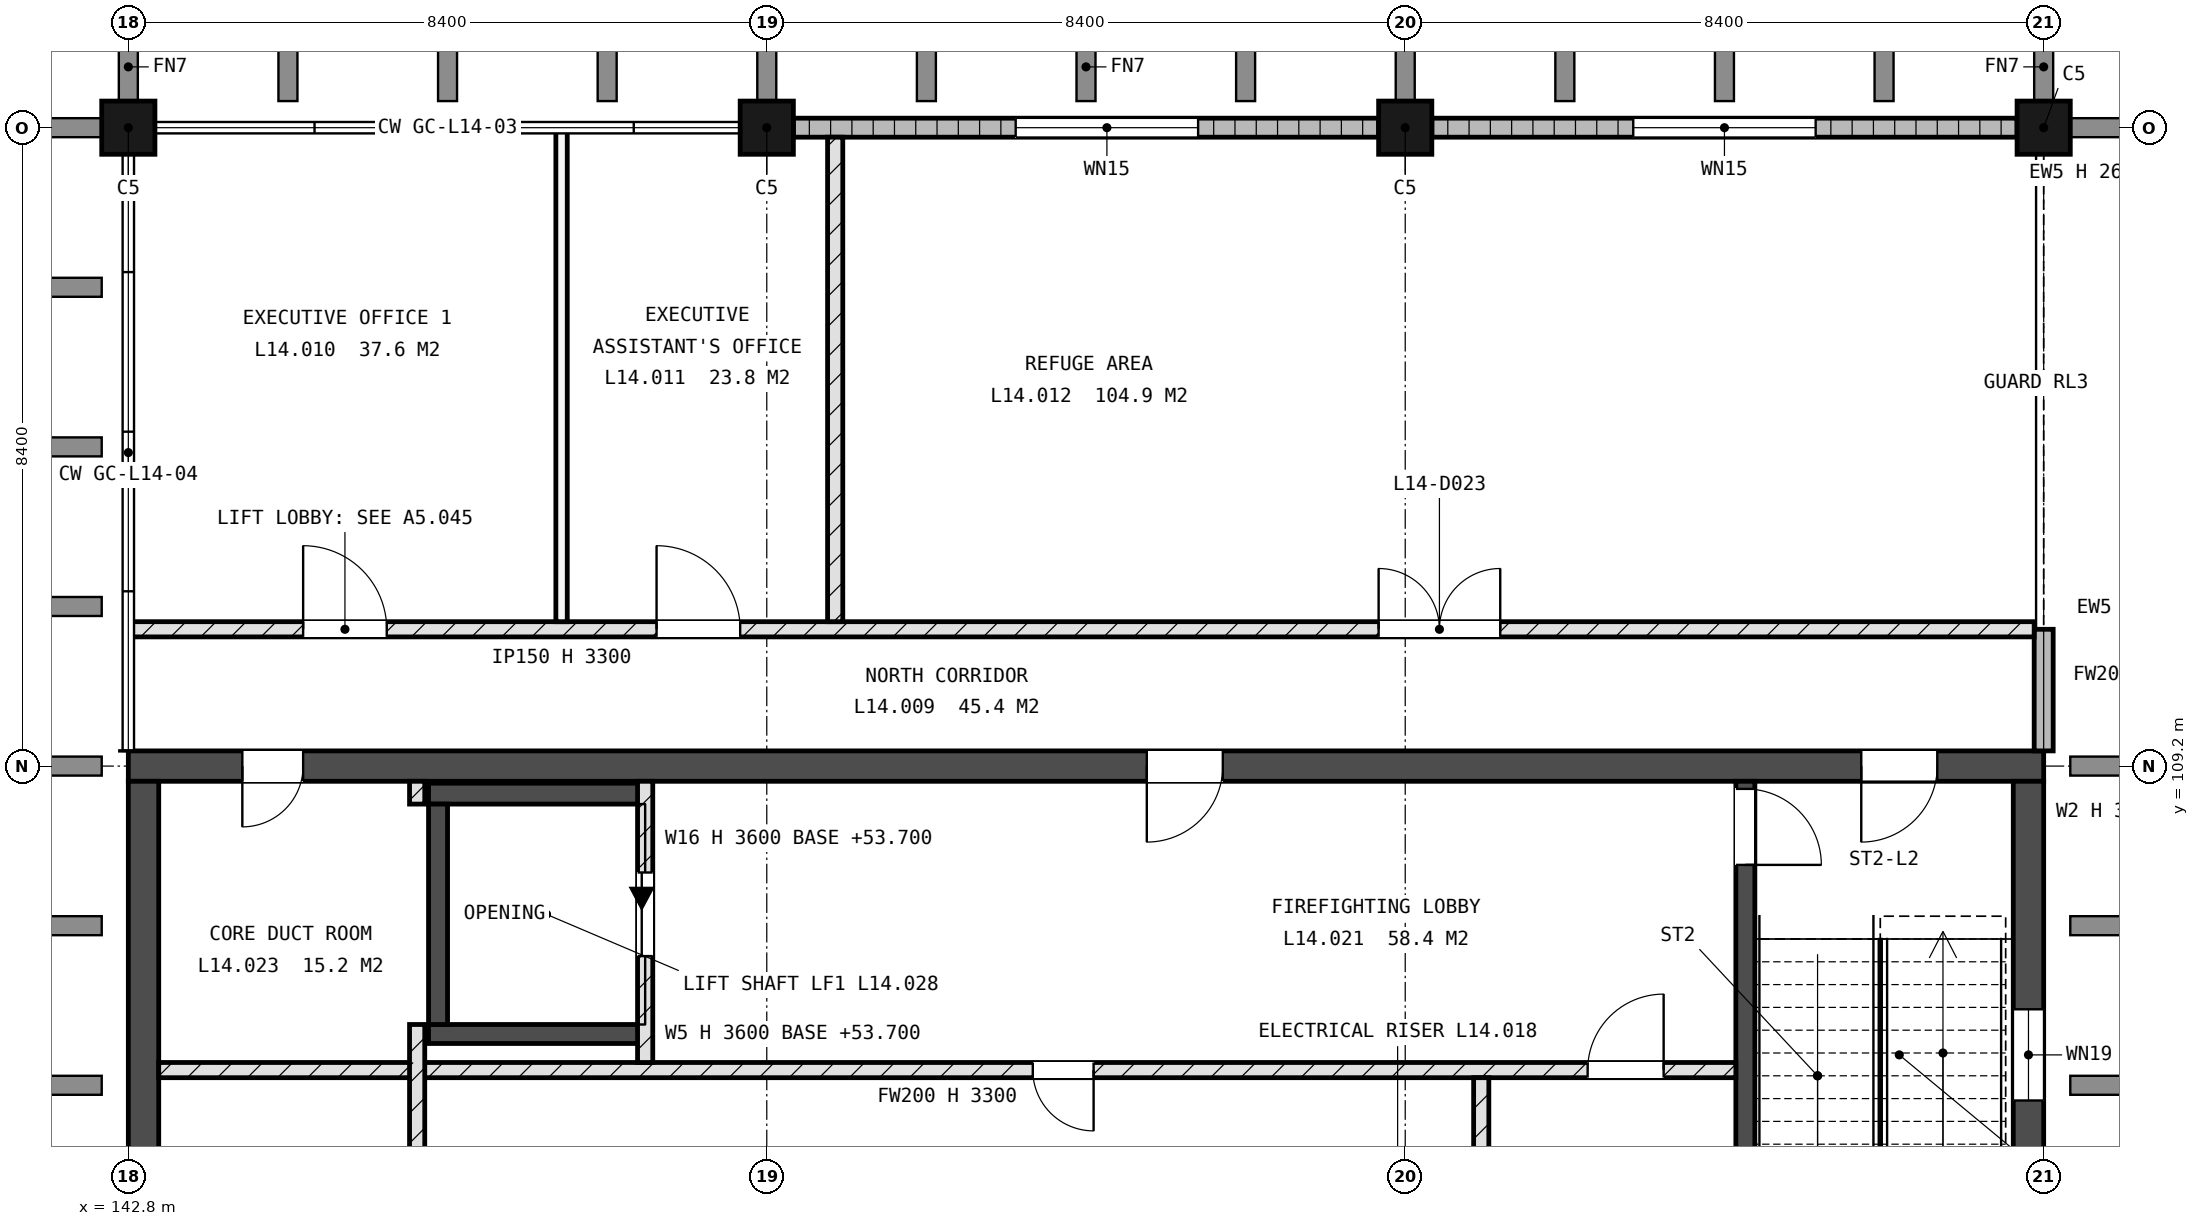
"""IFC4 building model, lengths in metres.
Left out: names, types, materials, properties, quantities, classifications, styles, units other than length and angle.
Written with IfcOpenShell. Run it as: python <this file> out.ifc"""

import sys

from ifc_helpers import new_model, si_unit, direction, frame, frame_2d, origin, origin_2d, place, context, subcontext, project, spatial, rectangle, extrude, element, fill, save


model = new_model("IFC4")
c1 = context("Model", 3, precision=1e-05, world=origin(), true_north=direction((0.0, 1.0)))
c2 = subcontext(c1, "Body", "Model", "MODEL_VIEW")
j1 = project(units=[si_unit("LENGTHUNIT", "METRE"), si_unit("PLANEANGLEUNIT", "RADIAN")], contexts=[c1])
p1 = place(None, origin())
s1 = spatial("IfcSite", under=j1, at=p1, CompositionType="ELEMENT")
p2 = place(p1, origin())
s2 = spatial("IfcBuilding", under=s1, at=p2, CompositionType="ELEMENT")
p3 = place(p2, frame((0.0, 0.0, 54.0)))
s3 = spatial("IfcBuildingStorey", under=s2, at=p3, CompositionType="ELEMENT", Elevation=54.0)
for number, where, z_axis, x_axis in (
    (1, (142.8, 117.6, -0.3), (0.0, 0.0, 1.0), (1.0, 0.0, 0.0)),
    (2, (151.2, 117.6, -0.3), (0.0, 0.0, 1.0), (1.0, 0.0, 0.0)),
    (3, (159.6, 117.6, -0.3), (0.0, 0.0, 1.0), (1.0, 0.0, 0.0)),
    (4, (168.0, 117.6, -0.3), (0.0, 0.0, 1.0), (1.0, 0.0, 0.0)),
):
    element("IfcColumn", number, at=place(p3, frame(where, z_axis=z_axis, x_axis=x_axis)), inside=s3, PredefinedType="COLUMN", context=c2, shape_type="SweptSolid", body=[
        extrude(rectangle(XDim=0.7, YDim=0.7, at=origin_2d()), origin(), (0.0, 0.0, 1.0), 3.6),
    ])
p4 = place(p3, frame((142.8, 109.2, -0.3), z_axis=(0.0, 0.0, 1.0), x_axis=(1.0, 0.0, 0.0)))
e5 = element("IfcWall", 5, at=p4, inside=s3, PredefinedType="SHEAR", context=c2, shape_type="SweptSolid", body=[
    extrude(rectangle(XDim=25.2, YDim=0.4, at=frame_2d((12.6, 0.0))), origin(), (0.0, 0.0, 1.0), 3.6),
])
p5 = place(p4, frame((22.8, 0.0, 0.3)))
e6 = element("IfcOpeningElement", 6, at=p5, cuts=e5, PredefinedType="OPENING", context=c2, shape_type="SweptSolid", body=[
    extrude(rectangle(XDim=1.0, YDim=2.1, at=frame_2d((0.5, 1.05))), frame((0.0, 0.21, 0.0), z_axis=(0.0, -1.0, 0.0), x_axis=(1.0, 0.0, 0.0)), (0.0, 0.0, 1.0), 0.42),
])
p6 = place(p4, frame((1.5, 0.0, 0.3)))
e7 = element("IfcOpeningElement", 7, at=p6, cuts=e5, PredefinedType="OPENING", context=c2, shape_type="SweptSolid", body=[
    extrude(rectangle(XDim=0.8, YDim=2.1, at=frame_2d((0.4, 1.05))), frame((0.0, 0.21, 0.0), z_axis=(0.0, -1.0, 0.0), x_axis=(1.0, 0.0, 0.0)), (0.0, 0.0, 1.0), 0.42),
])
p7 = place(p4, frame((13.4, 0.0, 0.3)))
e8 = element("IfcOpeningElement", 8, at=p7, cuts=e5, PredefinedType="OPENING", context=c2, shape_type="SweptSolid", body=[
    extrude(rectangle(XDim=1.0, YDim=2.1, at=frame_2d((0.5, 1.05))), frame((0.0, 0.21, 0.0), z_axis=(0.0, -1.0, 0.0), x_axis=(1.0, 0.0, 0.0)), (0.0, 0.0, 1.0), 0.42),
])
p8 = place(p3, frame((143.0, 92.6, -0.3), z_axis=(0.0, 0.0, 1.0), x_axis=(0.0, 1.0, 0.0)))
e9 = element("IfcWall", 9, at=p8, inside=s3, PredefinedType="SHEAR", context=c2, shape_type="SweptSolid", body=[
    extrude(rectangle(XDim=16.4, YDim=0.4, at=frame_2d((8.2, 0.0))), origin(), (0.0, 0.0, 1.0), 3.6),
])
p9 = place(p8, frame((3.0, 0.0, 1.9)))
e10 = element("IfcOpeningElement", 10, at=p9, cuts=e9, PredefinedType="OPENING", context=c2, shape_type="SweptSolid", body=[
    extrude(rectangle(XDim=1.2, YDim=0.9, at=frame_2d((0.6, 0.45))), frame((0.0, 0.21, 0.0), z_axis=(0.0, -1.0, 0.0), x_axis=(1.0, 0.0, 0.0)), (0.0, 0.0, 1.0), 0.42),
])
p10 = place(p3, frame((167.8, 92.6, -0.3), z_axis=(0.0, 0.0, 1.0), x_axis=(0.0, 1.0, 0.0)))
e11 = element("IfcWall", 11, at=p10, inside=s3, PredefinedType="SHEAR", context=c2, shape_type="SweptSolid", body=[
    extrude(rectangle(XDim=16.4, YDim=0.4, at=frame_2d((8.2, 0.0))), origin(), (0.0, 0.0, 1.0), 3.6),
])
p11 = place(p10, frame((12.2, 0.0, 1.9)))
e12 = element("IfcOpeningElement", 12, at=p11, cuts=e11, PredefinedType="OPENING", context=c2, shape_type="SweptSolid", body=[
    extrude(rectangle(XDim=1.2, YDim=0.9, at=frame_2d((0.6, 0.45))), frame((0.0, 0.21, 0.0), z_axis=(0.0, -1.0, 0.0), x_axis=(1.0, 0.0, 0.0)), (0.0, 0.0, 1.0), 0.42),
])
p12 = place(p3, frame((164.075, 101.35, -0.3), z_axis=(0.0, 0.0, 1.0), x_axis=(0.0, 1.0, 0.0)))
e13 = element("IfcWall", 13, at=p12, inside=s3, PredefinedType="SHEAR", context=c2, shape_type="SweptSolid", body=[
    extrude(rectangle(XDim=7.65, YDim=0.25, at=frame_2d((3.825, 0.0))), origin(), (0.0, 0.0, 1.0), 3.6),
])
p13 = place(p12, frame((6.55, 0.0, 0.3)))
e14 = element("IfcOpeningElement", 14, at=p13, cuts=e13, PredefinedType="OPENING", context=c2, shape_type="SweptSolid", body=[
    extrude(rectangle(XDim=1.0, YDim=2.1, at=frame_2d((0.5, 1.05))), frame((0.0, 0.135, 0.0), z_axis=(0.0, -1.0, 0.0), x_axis=(1.0, 0.0, 0.0)), (0.0, 0.0, 1.0), 0.27),
])
p14 = place(p3, frame((146.75, 105.675, -0.3), z_axis=(0.0, 0.0, 1.0), x_axis=(1.0, 0.0, 0.0)))
e15 = element("IfcWall", 15, at=p14, inside=s3, PredefinedType="SHEAR", context=c2, shape_type="SweptSolid", body=[
    extrude(rectangle(XDim=2.85, YDim=0.25, at=frame_2d((1.425, 0.0))), origin(), (0.0, 0.0, 1.0), 3.6),
])
p15 = place(p3, frame((146.75, 108.837, -0.3), z_axis=(0.0, 0.0, 1.0), x_axis=(1.0, 0.0, 0.0)))
e16 = element("IfcWall", 16, at=p15, inside=s3, PredefinedType="SHEAR", context=c2, shape_type="SweptSolid", body=[
    extrude(rectangle(XDim=2.85, YDim=0.275, at=frame_2d((1.425, 0.0))), origin(), (0.0, 0.0, 1.0), 3.6),
])
p16 = place(p3, frame((146.875, 105.8, -0.3), z_axis=(0.0, 0.0, 1.0), x_axis=(0.0, 1.0, 0.0)))
e17 = element("IfcWall", 17, at=p16, inside=s3, PredefinedType="SHEAR", context=c2, shape_type="SweptSolid", body=[
    extrude(rectangle(XDim=2.9, YDim=0.25, at=frame_2d((1.45, 0.0))), origin(), (0.0, 0.0, 1.0), 3.6),
])
p17 = place(p3, frame((151.55, 117.6, 0.0), z_axis=(0.0, 0.0, 1.0), x_axis=(1.0, 0.0, 0.0)))
e18 = element("IfcWall", 18, at=p17, inside=s3, PredefinedType="STANDARD", context=c2, shape_type="SweptSolid", body=[
    extrude(rectangle(XDim=7.7, YDim=0.25, at=frame_2d((3.85, 0.0))), origin(), (0.0, 0.0, 1.0), 2.65),
])
p18 = place(p17, frame((2.925, 0.0, 0.9)))
e19 = element("IfcOpeningElement", 19, at=p18, cuts=e18, PredefinedType="OPENING", context=c2, shape_type="SweptSolid", body=[
    extrude(rectangle(XDim=2.4, YDim=1.5, at=frame_2d((1.2, 0.75))), frame((0.0, 0.135, 0.0), z_axis=(0.0, -1.0, 0.0), x_axis=(1.0, 0.0, 0.0)), (0.0, 0.0, 1.0), 0.27),
])
p19 = place(p3, frame((159.95, 117.6, 0.0), z_axis=(0.0, 0.0, 1.0), x_axis=(1.0, 0.0, 0.0)))
e20 = element("IfcWall", 20, at=p19, inside=s3, PredefinedType="STANDARD", context=c2, shape_type="SweptSolid", body=[
    extrude(rectangle(XDim=7.7, YDim=0.25, at=frame_2d((3.85, 0.0))), origin(), (0.0, 0.0, 1.0), 2.65),
])
p20 = place(p19, frame((2.65, 0.0, 0.9)))
e21 = element("IfcOpeningElement", 21, at=p20, cuts=e20, PredefinedType="OPENING", context=c2, shape_type="SweptSolid", body=[
    extrude(rectangle(XDim=2.4, YDim=1.5, at=frame_2d((1.2, 0.75))), frame((0.0, 0.135, 0.0), z_axis=(0.0, -1.0, 0.0), x_axis=(1.0, 0.0, 0.0)), (0.0, 0.0, 1.0), 0.27),
])
p21 = place(p3, frame((168.0, 109.4, 0.0), z_axis=(0.0, 0.0, 1.0), x_axis=(0.0, 1.0, 0.0)))
e22 = element("IfcWall", 22, at=p21, inside=s3, PredefinedType="STANDARD", context=c2, shape_type="SweptSolid", body=[
    extrude(rectangle(XDim=1.6, YDim=0.25, at=frame_2d((0.8, 0.0))), origin(), (0.0, 0.0, 1.0), 3.3),
])
p22 = place(p3, frame((143.2, 105.2, 0.0), z_axis=(0.0, 0.0, 1.0), x_axis=(1.0, 0.0, 0.0)))
e23 = element("IfcWall", 23, at=p22, inside=s3, PredefinedType="SOLIDWALL", context=c2, shape_type="SweptSolid", body=[
    extrude(rectangle(XDim=20.75, YDim=0.2, at=frame_2d((10.375, 0.0))), origin(), (0.0, 0.0, 1.0), 3.3),
])
p23 = place(p22, frame((11.5, 0.0, 0.0)))
e24 = element("IfcOpeningElement", 24, at=p23, cuts=e23, PredefinedType="OPENING", context=c2, shape_type="SweptSolid", body=[
    extrude(rectangle(XDim=0.8, YDim=2.1, at=frame_2d((0.4, 1.05))), frame((0.0, 0.11, 0.0), z_axis=(0.0, -1.0, 0.0), x_axis=(1.0, 0.0, 0.0)), (0.0, 0.0, 1.0), 0.22),
])
p24 = place(p22, frame((18.8, 0.0, 0.0)))
e25 = element("IfcOpeningElement", 25, at=p24, cuts=e23, PredefinedType="OPENING", context=c2, shape_type="SweptSolid", body=[
    extrude(rectangle(XDim=1.0, YDim=2.1, at=frame_2d((0.5, 1.05))), frame((0.0, 0.11, 0.0), z_axis=(0.0, -1.0, 0.0), x_axis=(1.0, 0.0, 0.0)), (0.0, 0.0, 1.0), 0.22),
])
p25 = place(p3, frame((142.8, 111.0, 0.0), z_axis=(0.0, 0.0, 1.0), x_axis=(1.0, 0.0, 0.0)))
e26 = element("IfcWall", 26, at=p25, inside=s3, PredefinedType="SOLIDWALL", context=c2, shape_type="SweptSolid", body=[
    extrude(rectangle(XDim=25.075, YDim=0.2, at=frame_2d((12.538, 0.0))), origin(), (0.0, 0.0, 1.0), 3.3),
])
p26 = place(p25, frame((2.3, 0.0, 0.0)))
e27 = element("IfcOpeningElement", 27, at=p26, cuts=e26, PredefinedType="OPENING", context=c2, shape_type="SweptSolid", body=[
    extrude(rectangle(XDim=1.1, YDim=2.25, at=frame_2d((0.55, 1.125))), frame((0.0, 0.11, 0.0), z_axis=(0.0, -1.0, 0.0), x_axis=(1.0, 0.0, 0.0)), (0.0, 0.0, 1.0), 0.22),
])
p27 = place(p25, frame((6.95, 0.0, 0.0)))
e28 = element("IfcOpeningElement", 28, at=p27, cuts=e26, PredefinedType="OPENING", context=c2, shape_type="SweptSolid", body=[
    extrude(rectangle(XDim=1.1, YDim=2.25, at=frame_2d((0.55, 1.125))), frame((0.0, 0.11, 0.0), z_axis=(0.0, -1.0, 0.0), x_axis=(1.0, 0.0, 0.0)), (0.0, 0.0, 1.0), 0.22),
])
p28 = place(p25, frame((16.45, 0.0, 0.0)))
e29 = element("IfcOpeningElement", 29, at=p28, cuts=e26, PredefinedType="OPENING", context=c2, shape_type="SweptSolid", body=[
    extrude(rectangle(XDim=1.6, YDim=2.25, at=frame_2d((0.8, 1.125))), frame((0.0, 0.11, 0.0), z_axis=(0.0, -1.0, 0.0), x_axis=(1.0, 0.0, 0.0)), (0.0, 0.0, 1.0), 0.22),
])
p29 = place(p3, frame((146.6, 100.5, 0.0), z_axis=(0.0, 0.0, 1.0), x_axis=(0.0, 1.0, 0.0)))
e30 = element("IfcWall", 30, at=p29, inside=s3, PredefinedType="SOLIDWALL", context=c2, shape_type="SweptSolid", body=[
    extrude(rectangle(XDim=5.3, YDim=0.2, at=frame_2d((2.65, 0.0))), origin(), (0.0, 0.0, 1.0), 3.3),
])
p30 = place(p29, frame((1.8, 0.0, 0.0)))
e31 = element("IfcOpeningElement", 31, at=p30, cuts=e30, PredefinedType="OPENING", context=c2, shape_type="SweptSolid", body=[
    extrude(rectangle(XDim=1.0, YDim=2.1, at=frame_2d((0.5, 1.05))), frame((0.0, 0.11, 0.0), z_axis=(0.0, -1.0, 0.0), x_axis=(1.0, 0.0, 0.0)), (0.0, 0.0, 1.0), 0.22),
])
p31 = place(p3, frame((146.6, 108.7, 0.0), z_axis=(0.0, 0.0, 1.0), x_axis=(0.0, 1.0, 0.0)))
e32 = element("IfcWall", 32, at=p31, inside=s3, PredefinedType="SOLIDWALL", context=c2, shape_type="SweptSolid", body=[
    extrude(rectangle(XDim=0.3, YDim=0.2, at=frame_2d((0.15, 0.0))), origin(), (0.0, 0.0, 1.0), 3.3),
])
p32 = place(p3, frame((148.5, 111.1, 0.0), z_axis=(0.0, 0.0, 1.0), x_axis=(0.0, 1.0, 0.0)))
e33 = element("IfcWall", 33, at=p32, inside=s3, PredefinedType="PARTITIONING", context=c2, shape_type="SweptSolid", body=[
    extrude(rectangle(XDim=6.5, YDim=0.15, at=frame_2d((3.25, 0.0))), origin(), (0.0, 0.0, 1.0), 3.3),
])
p33 = place(p3, frame((149.6, 105.3, 0.0), z_axis=(0.0, 0.0, 1.0), x_axis=(0.0, 1.0, 0.0)))
e34 = element("IfcWall", 34, at=p33, inside=s3, PredefinedType="SOLIDWALL", context=c2, shape_type="SweptSolid", body=[
    extrude(rectangle(XDim=3.7, YDim=0.2, at=frame_2d((1.85, 0.0))), origin(), (0.0, 0.0, 1.0), 3.3),
])
p34 = place(p33, frame((1.4, 0.0, 0.0)))
e35 = element("IfcOpeningElement", 35, at=p34, cuts=e34, PredefinedType="OPENING", context=c2, shape_type="SweptSolid", body=[
    extrude(rectangle(XDim=1.1, YDim=2.1, at=frame_2d((0.55, 1.05))), frame((0.0, 0.11, 0.0), z_axis=(0.0, -1.0, 0.0), x_axis=(1.0, 0.0, 0.0)), (0.0, 0.0, 1.0), 0.22),
])
p35 = place(p3, frame((152.1, 111.1, 0.0), z_axis=(0.0, 0.0, 1.0), x_axis=(0.0, 1.0, 0.0)))
e36 = element("IfcWall", 36, at=p35, inside=s3, PredefinedType="SOLIDWALL", context=c2, shape_type="SweptSolid", body=[
    extrude(rectangle(XDim=6.375, YDim=0.2, at=frame_2d((3.188, 0.0))), origin(), (0.0, 0.0, 1.0), 3.3),
])
p36 = place(p3, frame((160.6, 92.6, 0.0), z_axis=(0.0, 0.0, 1.0), x_axis=(0.0, 1.0, 0.0)))
e37 = element("IfcWall", 37, at=p36, inside=s3, PredefinedType="SOLIDWALL", context=c2, shape_type="SweptSolid", body=[
    extrude(rectangle(XDim=12.5, YDim=0.2, at=frame_2d((6.25, 0.0))), origin(), (0.0, 0.0, 1.0), 3.3),
])
p37 = place(p36, frame((5.1, 0.0, 0.0)))
e38 = element("IfcOpeningElement", 38, at=p37, cuts=e37, PredefinedType="OPENING", context=c2, shape_type="SweptSolid", body=[
    extrude(rectangle(XDim=0.8, YDim=2.1, at=frame_2d((0.4, 1.05))), frame((0.0, 0.11, 0.0), z_axis=(0.0, -1.0, 0.0), x_axis=(1.0, 0.0, 0.0)), (0.0, 0.0, 1.0), 0.22),
])
p38 = place(p36, frame((0.8, 0.0, 0.0)))
e39 = element("IfcOpeningElement", 39, at=p38, cuts=e37, PredefinedType="OPENING", context=c2, shape_type="SweptSolid", body=[
    extrude(rectangle(XDim=1.0, YDim=2.1, at=frame_2d((0.5, 1.05))), frame((0.0, 0.11, 0.0), z_axis=(0.0, -1.0, 0.0), x_axis=(1.0, 0.0, 0.0)), (0.0, 0.0, 1.0), 0.22),
])
p39 = place(p18, origin())
e40 = element("IfcWindow", 40, at=p39, inside=s3, PartitioningType="SINGLE_PANEL", PredefinedType="WINDOW", context=c2, shape_type="SweptSolid", body=[
    extrude(rectangle(XDim=2.4, YDim=1.5, at=frame_2d((1.2, 0.75))), frame((0.0, 0.03, 0.0), z_axis=(0.0, -1.0, 0.0), x_axis=(1.0, 0.0, 0.0)), (0.0, 0.0, 1.0), 0.06),
])
fill(e19, e40)
p40 = place(p20, origin())
e41 = element("IfcWindow", 41, at=p40, inside=s3, PartitioningType="SINGLE_PANEL", PredefinedType="WINDOW", context=c2, shape_type="SweptSolid", body=[
    extrude(rectangle(XDim=2.4, YDim=1.5, at=frame_2d((1.2, 0.75))), frame((0.0, 0.03, 0.0), z_axis=(0.0, -1.0, 0.0), x_axis=(1.0, 0.0, 0.0)), (0.0, 0.0, 1.0), 0.06),
])
fill(e21, e41)
p41 = place(p11, origin())
e42 = element("IfcWindow", 42, at=p41, inside=s3, PartitioningType="SINGLE_PANEL", PredefinedType="WINDOW", context=c2, shape_type="SweptSolid", body=[
    extrude(rectangle(XDim=1.2, YDim=0.9, at=frame_2d((0.6, 0.45))), frame((0.0, 0.03, 0.0), z_axis=(0.0, -1.0, 0.0), x_axis=(1.0, 0.0, 0.0)), (0.0, 0.0, 1.0), 0.06),
])
fill(e12, e42)
p42 = place(p34, origin())
e43 = element("IfcDoor", 43, at=p42, inside=s3, OperationType="SLIDING_TO_LEFT", PredefinedType="DOOR", context=c2, shape_type="SweptSolid", body=[
    extrude(rectangle(XDim=1.1, YDim=2.1, at=frame_2d((0.55, 1.05))), frame((0.0, 0.025, 0.0), z_axis=(0.0, -1.0, 0.0), x_axis=(1.0, 0.0, 0.0)), (0.0, 0.0, 1.0), 0.05),
])
fill(e35, e43)
p43 = place(p13, origin())
e44 = element("IfcDoor", 44, at=p43, inside=s3, OperationType="SINGLE_SWING_LEFT", PredefinedType="DOOR", context=c2, shape_type="SweptSolid", body=[
    extrude(rectangle(XDim=1.0, YDim=2.1, at=frame_2d((0.5, 1.05))), frame((0.0, 0.025, 0.0), z_axis=(0.0, -1.0, 0.0), x_axis=(1.0, 0.0, 0.0)), (0.0, 0.0, 1.0), 0.05),
])
fill(e14, e44)
p44 = place(p5, origin())
e45 = element("IfcDoor", 45, at=p44, inside=s3, OperationType="SINGLE_SWING_LEFT", PredefinedType="DOOR", context=c2, shape_type="SweptSolid", body=[
    extrude(rectangle(XDim=1.0, YDim=2.1, at=frame_2d((0.5, 1.05))), frame((0.0, 0.025, 0.0), z_axis=(0.0, -1.0, 0.0), x_axis=(1.0, 0.0, 0.0)), (0.0, 0.0, 1.0), 0.05),
])
fill(e6, e45)
p45 = place(p26, origin())
e46 = element("IfcDoor", 46, at=p45, inside=s3, OperationType="SINGLE_SWING_RIGHT", PredefinedType="DOOR", context=c2, shape_type="SweptSolid", body=[
    extrude(rectangle(XDim=1.1, YDim=2.25, at=frame_2d((0.55, 1.125))), frame((0.0, 0.025, 0.0), z_axis=(0.0, -1.0, 0.0), x_axis=(1.0, 0.0, 0.0)), (0.0, 0.0, 1.0), 0.05),
])
fill(e27, e46)
p46 = place(p27, origin())
e47 = element("IfcDoor", 47, at=p46, inside=s3, OperationType="SINGLE_SWING_RIGHT", PredefinedType="DOOR", context=c2, shape_type="SweptSolid", body=[
    extrude(rectangle(XDim=1.1, YDim=2.25, at=frame_2d((0.55, 1.125))), frame((0.0, 0.025, 0.0), z_axis=(0.0, -1.0, 0.0), x_axis=(1.0, 0.0, 0.0)), (0.0, 0.0, 1.0), 0.05),
])
fill(e28, e47)
p47 = place(p28, origin())
e48 = element("IfcDoor", 48, at=p47, inside=s3, OperationType="DOUBLE_DOOR_SINGLE_SWING", PredefinedType="DOOR", context=c2, shape_type="SweptSolid", body=[
    extrude(rectangle(XDim=1.6, YDim=2.25, at=frame_2d((0.8, 1.125))), frame((0.0, 0.025, 0.0), z_axis=(0.0, -1.0, 0.0), x_axis=(1.0, 0.0, 0.0)), (0.0, 0.0, 1.0), 0.05),
])
fill(e29, e48)
p48 = place(p23, origin())
e49 = element("IfcDoor", 49, at=p48, inside=s3, OperationType="SINGLE_SWING_RIGHT", PredefinedType="DOOR", context=c2, shape_type="SweptSolid", body=[
    extrude(rectangle(XDim=0.8, YDim=2.1, at=frame_2d((0.4, 1.05))), frame((0.0, 0.025, 0.0), z_axis=(0.0, -1.0, 0.0), x_axis=(1.0, 0.0, 0.0)), (0.0, 0.0, 1.0), 0.05),
])
fill(e24, e49)
p49 = place(p6, origin())
e50 = element("IfcDoor", 50, at=p49, inside=s3, OperationType="SINGLE_SWING_LEFT", PredefinedType="DOOR", context=c2, shape_type="SweptSolid", body=[
    extrude(rectangle(XDim=0.8, YDim=2.1, at=frame_2d((0.4, 1.05))), frame((0.0, 0.025, 0.0), z_axis=(0.0, -1.0, 0.0), x_axis=(1.0, 0.0, 0.0)), (0.0, 0.0, 1.0), 0.05),
])
fill(e7, e50)
p50 = place(p7, origin())
e51 = element("IfcDoor", 51, at=p50, inside=s3, OperationType="SINGLE_SWING_LEFT", PredefinedType="DOOR", context=c2, shape_type="SweptSolid", body=[
    extrude(rectangle(XDim=1.0, YDim=2.1, at=frame_2d((0.5, 1.05))), frame((0.0, 0.025, 0.0), z_axis=(0.0, -1.0, 0.0), x_axis=(1.0, 0.0, 0.0)), (0.0, 0.0, 1.0), 0.05),
])
fill(e8, e51)
p51 = place(p24, origin())
e52 = element("IfcDoor", 52, at=p51, inside=s3, OperationType="SINGLE_SWING_LEFT", PredefinedType="DOOR", context=c2, shape_type="SweptSolid", body=[
    extrude(rectangle(XDim=1.0, YDim=2.1, at=frame_2d((0.5, 1.05))), frame((0.0, 0.025, 0.0), z_axis=(0.0, -1.0, 0.0), x_axis=(1.0, 0.0, 0.0)), (0.0, 0.0, 1.0), 0.05),
])
fill(e25, e52)
save(model, sys.argv[1])
